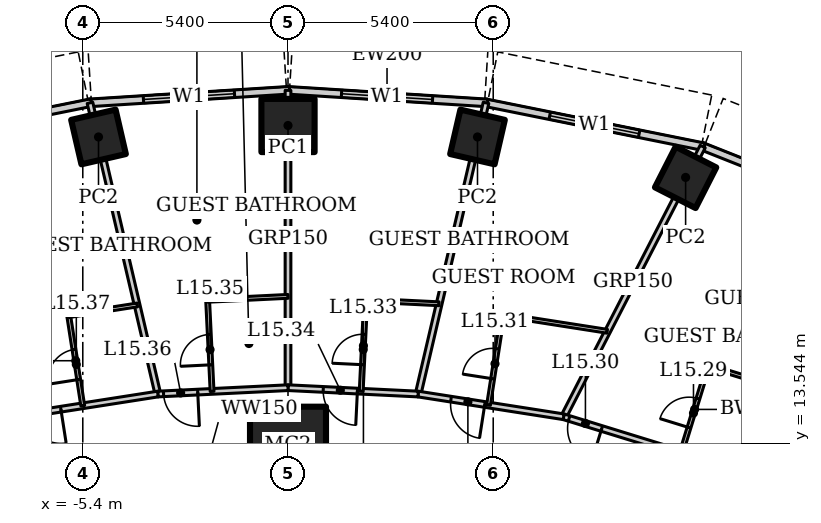
"""IFC4 building model, lengths in metres.
Left out: names, types, materials, properties, quantities, classifications, styles, units other than length and angle.
Written with IfcOpenShell. Run it as: python <this file> out.ifc"""

import sys

from ifc_helpers import new_model, si_unit, direction, frame, frame_2d, origin, origin_2d, place, context, subcontext, project, spatial, rectangle, hollow_rectangle, extrude, element, fill, save


model = new_model("IFC4")
c1 = context("Model", 3, precision=1e-05, world=origin(), true_north=direction((0.0, 1.0)))
c2 = subcontext(c1, "Body", "Model", "MODEL_VIEW")
j1 = project(units=[si_unit("LENGTHUNIT", "METRE"), si_unit("PLANEANGLEUNIT", "RADIAN")], contexts=[c1])
p1 = place(None, origin())
s1 = spatial("IfcSite", under=j1, at=p1, CompositionType="ELEMENT")
p2 = place(p1, origin())
s2 = spatial("IfcBuilding", under=s1, at=p2, CompositionType="ELEMENT")
p3 = place(p2, frame((0.0, 0.0, 69.4)))
s3 = spatial("IfcBuildingStorey", under=s2, at=p3, CompositionType="ELEMENT", Elevation=69.4)
p4 = place(p3, frame((0.0, 13.5, 0.0), z_axis=(0.0, 0.0, 1.0), x_axis=(1.0, 0.0, 0.0)))
e1 = element("IfcColumn", 1, at=p4, inside=s3, PredefinedType="COLUMN", context=c2, shape_type="SweptSolid", body=[
    extrude(hollow_rectangle(XDim=2.0, YDim=2.0, WallThickness=0.17, at=origin_2d()), origin(), (0.0, 0.0, 1.0), 3.6),
])
for number, where, z_axis, x_axis in (
    (2, (10.463, 20.534, 0.0), (0.0, 0.0, 1.0), (0.454, 0.891, 0.0)),
    (3, (4.986, 21.598, 0.0), (0.0, 0.0, 1.0), (0.225, 0.974, 0.0)),
):
    element("IfcColumn", number, at=place(p3, frame(where, z_axis=z_axis, x_axis=x_axis)), inside=s3, PredefinedType="COLUMN", context=c2, shape_type="SweptSolid", body=[
        extrude(hollow_rectangle(XDim=1.2, YDim=1.2, WallThickness=0.1, at=origin_2d()), origin(), (0.0, 0.0, 1.0), 3.6),
    ])
p5 = place(p3, frame((0.0, 21.9, 0.0), z_axis=(0.0, 0.0, 1.0), x_axis=(1.0, 0.0, 0.0)))
e4 = element("IfcColumn", 4, at=p5, inside=s3, PredefinedType="COLUMN", context=c2, shape_type="SweptSolid", body=[
    extrude(hollow_rectangle(XDim=1.4, YDim=1.4, WallThickness=0.1, at=origin_2d()), origin(), (0.0, 0.0, 1.0), 3.6),
])
p6 = place(p3, frame((-4.986, 21.598, 0.0), z_axis=(0.0, 0.0, 1.0), x_axis=(0.974370064785, 0.224951054344, 0.0)))
e5 = element("IfcColumn", 5, at=p6, inside=s3, PredefinedType="COLUMN", context=c2, shape_type="SweptSolid", body=[
    extrude(hollow_rectangle(XDim=1.2, YDim=1.2, WallThickness=0.1, at=origin_2d()), origin(), (0.0, 0.0, 1.0), 3.6),
])
p7 = place(p3, frame((18.018, 18.523, 0.0), z_axis=(0.0, 0.0, 1.0), x_axis=(-0.929358351251, 0.369178892895, 0.0)))
e6 = element("IfcWall", 6, at=p7, inside=s3, PredefinedType="SOLIDWALL", context=c2, shape_type="SweptSolid", body=[
    extrude(rectangle(XDim=7.692, YDim=0.2, at=frame_2d((3.846, 0.0))), origin(), (0.0, 0.0, 1.0), 3.45),
])
p8 = place(p7, frame((2.646, 0.0, 0.5)))
e7 = element("IfcOpeningElement", 7, at=p8, cuts=e6, PredefinedType="OPENING", context=c2, shape_type="SweptSolid", body=[
    extrude(rectangle(XDim=2.4, YDim=2.2, at=frame_2d((1.2, 1.1))), frame((0.0, 0.11, 0.0), z_axis=(0.0, -1.0, 0.0), x_axis=(1.0, 0.0, 0.0)), (0.0, 0.0, 1.0), 0.22),
])
p9 = place(p3, frame((10.957, 21.337, 0.0), z_axis=(0.0, 0.0, 1.0), x_axis=(-0.980251657452, 0.197754110105, 0.0)))
e8 = element("IfcWall", 8, at=p9, inside=s3, PredefinedType="SOLIDWALL", context=c2, shape_type="SweptSolid", body=[
    extrude(rectangle(XDim=5.904, YDim=0.2, at=frame_2d((2.952, 0.0))), origin(), (0.0, 0.0, 1.0), 3.45),
])
p10 = place(p9, frame((1.752, 0.0, 0.5)))
e9 = element("IfcOpeningElement", 9, at=p10, cuts=e8, PredefinedType="OPENING", context=c2, shape_type="SweptSolid", body=[
    extrude(rectangle(XDim=2.4, YDim=2.2, at=frame_2d((1.2, 1.1))), frame((0.0, 0.11, 0.0), z_axis=(0.0, -1.0, 0.0), x_axis=(1.0, 0.0, 0.0)), (0.0, 0.0, 1.0), 0.22),
])
p11 = place(p3, frame((5.253, 22.493, 0.0), z_axis=(0.0, 0.0, 1.0), x_axis=(-0.998018582375, 0.062919863585, 0.0)))
e10 = element("IfcWall", 10, at=p11, inside=s3, PredefinedType="SOLIDWALL", context=c2, shape_type="SweptSolid", body=[
    extrude(rectangle(XDim=5.304, YDim=0.2, at=frame_2d((2.652, 0.0))), origin(), (0.0, 0.0, 1.0), 3.45),
])
p12 = place(p11, frame((1.452, 0.0, 0.5)))
e11 = element("IfcOpeningElement", 11, at=p12, cuts=e10, PredefinedType="OPENING", context=c2, shape_type="SweptSolid", body=[
    extrude(rectangle(XDim=2.4, YDim=2.2, at=frame_2d((1.2, 1.1))), frame((0.0, 0.11, 0.0), z_axis=(0.0, -1.0, 0.0), x_axis=(1.0, 0.0, 0.0)), (0.0, 0.0, 1.0), 0.22),
])
p13 = place(p3, frame((0.041, 22.827, 0.0), z_axis=(0.0, 0.0, 1.0), x_axis=(-0.998018582375, -0.062919863585, 0.0)))
e12 = element("IfcWall", 12, at=p13, inside=s3, PredefinedType="SOLIDWALL", context=c2, shape_type="SweptSolid", body=[
    extrude(rectangle(XDim=5.304, YDim=0.2, at=frame_2d((2.652, 0.0))), origin(), (0.0, 0.0, 1.0), 3.45),
])
p14 = place(p13, frame((1.452, 0.0, 0.5)))
e13 = element("IfcOpeningElement", 13, at=p14, cuts=e12, PredefinedType="OPENING", context=c2, shape_type="SweptSolid", body=[
    extrude(rectangle(XDim=2.4, YDim=2.2, at=frame_2d((1.2, 1.1))), frame((0.0, 0.11, 0.0), z_axis=(0.0, -1.0, 0.0), x_axis=(1.0, 0.0, 0.0)), (0.0, 0.0, 1.0), 0.22),
])
p15 = place(p3, frame((-5.17, 22.504, 0.0), z_axis=(0.0, 0.0, 1.0), x_axis=(-0.980251657452, -0.197754110105, 0.0)))
e14 = element("IfcWall", 14, at=p15, inside=s3, PredefinedType="SOLIDWALL", context=c2, shape_type="SweptSolid", body=[
    extrude(rectangle(XDim=5.904, YDim=0.2, at=frame_2d((2.952, 0.0))), origin(), (0.0, 0.0, 1.0), 3.45),
])
p16 = place(p15, frame((1.752, 0.0, 0.5)))
e15 = element("IfcOpeningElement", 15, at=p16, cuts=e14, PredefinedType="OPENING", context=c2, shape_type="SweptSolid", body=[
    extrude(rectangle(XDim=2.4, YDim=2.2, at=frame_2d((1.2, 1.1))), frame((0.0, 0.11, 0.0), z_axis=(0.0, -1.0, 0.0), x_axis=(1.0, 0.0, 0.0)), (0.0, 0.0, 1.0), 0.22),
])
p17 = place(p3, frame((10.912, 21.346, 0.0), z_axis=(0.0, 0.0, 1.0), x_axis=(-0.45752665959, -0.889195904042, 0.0)))
e16 = element("IfcWall", 16, at=p17, inside=s3, PredefinedType="PARTITIONING", context=c2, shape_type="SweptSolid", body=[
    extrude(rectangle(XDim=7.997, YDim=0.15, at=frame_2d((3.999, 0.0))), origin(), (0.0, 0.0, 1.0), 2.528),
])
p18 = place(p3, frame((5.211, 22.496, 0.0), z_axis=(0.0, 0.0, 1.0), x_axis=(-0.227056984461, -0.973881474209, 0.0)))
e17 = element("IfcWall", 17, at=p18, inside=s3, PredefinedType="PARTITIONING", context=c2, shape_type="SweptSolid", body=[
    extrude(rectangle(XDim=7.869, YDim=0.15, at=frame_2d((3.934, 0.0))), origin(), (0.0, 0.0, 1.0), 2.767),
])
p19 = place(p3, frame((0.0, 22.825, 0.0), z_axis=(0.0, 0.0, 1.0), x_axis=(0.0, -1.0, 0.0)))
e18 = element("IfcWall", 18, at=p19, inside=s3, PredefinedType="PARTITIONING", context=c2, shape_type="SweptSolid", body=[
    extrude(rectangle(XDim=7.825, YDim=0.15, at=frame_2d((3.912, 0.0))), origin(), (0.0, 0.0, 1.0), 2.924),
])
p20 = place(p3, frame((-5.211, 22.496, 0.0), z_axis=(0.0, 0.0, 1.0), x_axis=(0.227056984461, -0.973881474209, 0.0)))
e19 = element("IfcWall", 19, at=p20, inside=s3, PredefinedType="PARTITIONING", context=c2, shape_type="SweptSolid", body=[
    extrude(rectangle(XDim=7.869, YDim=0.15, at=frame_2d((3.934, 0.0))), origin(), (0.0, 0.0, 1.0), 2.767),
])
p21 = place(p3, frame((12.257, 12.693, 0.0), z_axis=(0.0, 0.0, 1.0), x_axis=(-0.955657956744, 0.294478980085, 0.0)))
e20 = element("IfcWall", 20, at=p21, inside=s3, PredefinedType="PARTITIONING", context=c2, shape_type="SweptSolid", body=[
    extrude(rectangle(XDim=5.236, YDim=0.15, at=frame_2d((2.618, 0.0))), origin(), (0.0, 0.0, 1.0), 3.45),
])
p22 = place(p21, frame((4.186, 0.0, 0.0)))
e21 = element("IfcOpeningElement", 21, at=p22, cuts=e20, PredefinedType="OPENING", context=c2, shape_type="SweptSolid", body=[
    extrude(rectangle(XDim=0.9, YDim=2.1, at=frame_2d((0.45, 1.05))), frame((0.0, 0.085, 0.0), z_axis=(0.0, -1.0, 0.0), x_axis=(1.0, 0.0, 0.0)), (0.0, 0.0, 1.0), 0.17),
])
p23 = place(p3, frame((7.253, 14.235, 0.0), z_axis=(0.0, 0.0, 1.0), x_axis=(-0.988015036573, 0.154357660987, 0.0)))
e22 = element("IfcWall", 22, at=p23, inside=s3, PredefinedType="PARTITIONING", context=c2, shape_type="SweptSolid", body=[
    extrude(rectangle(XDim=3.875, YDim=0.15, at=frame_2d((1.938, 0.0))), origin(), (0.0, 0.0, 1.0), 3.45),
])
p24 = place(p23, frame((2.1, 0.0, 0.0)))
e23 = element("IfcOpeningElement", 23, at=p24, cuts=e22, PredefinedType="OPENING", context=c2, shape_type="SweptSolid", body=[
    extrude(rectangle(XDim=0.9, YDim=2.1, at=frame_2d((0.45, 1.05))), frame((0.0, 0.085, 0.0), z_axis=(0.0, -1.0, 0.0), x_axis=(1.0, 0.0, 0.0)), (0.0, 0.0, 1.0), 0.17),
])
p25 = place(p3, frame((3.424, 14.833, 0.0), z_axis=(0.0, 0.0, 1.0), x_axis=(-0.998809560203, 0.048779733975, 0.0)))
e24 = element("IfcWall", 24, at=p25, inside=s3, PredefinedType="PARTITIONING", context=c2, shape_type="SweptSolid", body=[
    extrude(rectangle(XDim=3.428, YDim=0.15, at=frame_2d((1.714, 0.0))), origin(), (0.0, 0.0, 1.0), 3.45),
])
p26 = place(p25, frame((1.6, 0.0, 0.0)))
e25 = element("IfcOpeningElement", 25, at=p26, cuts=e24, PredefinedType="OPENING", context=c2, shape_type="SweptSolid", body=[
    extrude(rectangle(XDim=0.9, YDim=2.1, at=frame_2d((0.45, 1.05))), frame((0.0, 0.085, 0.0), z_axis=(0.0, -1.0, 0.0), x_axis=(1.0, 0.0, 0.0)), (0.0, 0.0, 1.0), 0.17),
])
p27 = place(p3, frame((0.0, 15.0, 0.0), z_axis=(0.0, 0.0, 1.0), x_axis=(-0.998809560203, -0.048779733975, 0.0)))
e26 = element("IfcWall", 26, at=p27, inside=s3, PredefinedType="PARTITIONING", context=c2, shape_type="SweptSolid", body=[
    extrude(rectangle(XDim=3.428, YDim=0.15, at=frame_2d((1.714, 0.0))), origin(), (0.0, 0.0, 1.0), 3.45),
])
p28 = place(p27, frame((2.378, 0.0, 0.0)))
e27 = element("IfcOpeningElement", 27, at=p28, cuts=e26, PredefinedType="OPENING", context=c2, shape_type="SweptSolid", body=[
    extrude(rectangle(XDim=0.9, YDim=2.1, at=frame_2d((0.45, 1.05))), frame((0.0, 0.085, 0.0), z_axis=(0.0, -1.0, 0.0), x_axis=(1.0, 0.0, 0.0)), (0.0, 0.0, 1.0), 0.17),
])
p29 = place(p3, frame((-3.424, 14.833, 0.0), z_axis=(0.0, 0.0, 1.0), x_axis=(-0.988015036573, -0.154357660987, 0.0)))
e28 = element("IfcWall", 28, at=p29, inside=s3, PredefinedType="PARTITIONING", context=c2, shape_type="SweptSolid", body=[
    extrude(rectangle(XDim=3.875, YDim=0.15, at=frame_2d((1.938, 0.0))), origin(), (0.0, 0.0, 1.0), 3.45),
])
p30 = place(p29, frame((2.583, 0.0, 0.0)))
e29 = element("IfcOpeningElement", 29, at=p30, cuts=e28, PredefinedType="OPENING", context=c2, shape_type="SweptSolid", body=[
    extrude(rectangle(XDim=0.9, YDim=2.1, at=frame_2d((0.45, 1.05))), frame((0.0, 0.085, 0.0), z_axis=(0.0, -1.0, 0.0), x_axis=(1.0, 0.0, 0.0)), (0.0, 0.0, 1.0), 0.17),
])
p31 = place(p3, frame((10.346, 13.281, 0.0), z_axis=(0.0, 0.0, 1.0), x_axis=(0.294478957423, 0.955657963727, 0.0)))
e30 = element("IfcWall", 30, at=p31, inside=s3, PredefinedType="PARTITIONING", context=c2, shape_type="SweptSolid", body=[
    extrude(rectangle(XDim=2.4, YDim=0.1, at=frame_2d((1.2, 0.0))), origin(), (0.0, 0.0, 1.0), 3.45),
])
p32 = place(p31, frame((0.7, 0.0, 0.0)))
e31 = element("IfcOpeningElement", 31, at=p32, cuts=e30, PredefinedType="OPENING", context=c2, shape_type="SweptSolid", body=[
    extrude(rectangle(XDim=0.8, YDim=2.1, at=frame_2d((0.4, 1.05))), frame((0.0, 0.06, 0.0), z_axis=(0.0, -1.0, 0.0), x_axis=(1.0, 0.0, 0.0)), (0.0, 0.0, 1.0), 0.12),
])
p33 = place(p3, frame((11.052, 15.575, 0.0), z_axis=(0.0, 0.0, 1.0), x_axis=(0.955641033268, -0.294533895391, 0.0)))
e32 = element("IfcWall", 32, at=p33, inside=s3, PredefinedType="PARTITIONING", context=c2, shape_type="SweptSolid", body=[
    extrude(rectangle(XDim=3.216, YDim=0.1, at=frame_2d((1.608, 0.0))), origin(), (0.0, 0.0, 1.0), 3.45),
])
p34 = place(p3, frame((5.277, 14.543, 0.0), z_axis=(0.0, 0.0, 1.0), x_axis=(0.154426532979, 0.988004274238, 0.0)))
e33 = element("IfcWall", 33, at=p34, inside=s3, PredefinedType="PARTITIONING", context=c2, shape_type="SweptSolid", body=[
    extrude(rectangle(XDim=2.4, YDim=0.1, at=frame_2d((1.2, 0.0))), origin(), (0.0, 0.0, 1.0), 3.45),
])
p35 = place(p34, frame((0.7, 0.0, 0.0)))
e34 = element("IfcOpeningElement", 34, at=p35, cuts=e33, PredefinedType="OPENING", context=c2, shape_type="SweptSolid", body=[
    extrude(rectangle(XDim=0.8, YDim=2.1, at=frame_2d((0.4, 1.05))), frame((0.0, 0.06, 0.0), z_axis=(0.0, -1.0, 0.0), x_axis=(1.0, 0.0, 0.0)), (0.0, 0.0, 1.0), 0.12),
])
p36 = place(p3, frame((5.647, 16.915, 0.0), z_axis=(0.0, 0.0, 1.0), x_axis=(0.988015375833, -0.154355489429, 0.0)))
e35 = element("IfcWall", 35, at=p36, inside=s3, PredefinedType="PARTITIONING", context=c2, shape_type="SweptSolid", body=[
    extrude(rectangle(XDim=2.785, YDim=0.1, at=frame_2d((1.393, 0.0))), origin(), (0.0, 0.0, 1.0), 3.45),
])
p37 = place(p3, frame((1.926, 14.906, 0.0), z_axis=(0.0, 0.0, 1.0), x_axis=(0.048725028858, 0.998812230383, 0.0)))
e36 = element("IfcWall", 36, at=p37, inside=s3, PredefinedType="PARTITIONING", context=c2, shape_type="SweptSolid", body=[
    extrude(rectangle(XDim=2.4, YDim=0.1, at=frame_2d((1.2, 0.0))), origin(), (0.0, 0.0, 1.0), 2.749),
])
p38 = place(p37, frame((0.7, 0.0, 0.0)))
e37 = element("IfcOpeningElement", 37, at=p38, cuts=e36, PredefinedType="OPENING", context=c2, shape_type="SweptSolid", body=[
    extrude(rectangle(XDim=0.8, YDim=2.1, at=frame_2d((0.4, 1.05))), frame((0.0, 0.06, 0.0), z_axis=(0.0, -1.0, 0.0), x_axis=(1.0, 0.0, 0.0)), (0.0, 0.0, 1.0), 0.12),
])
p39 = place(p3, frame((2.043, 17.303, 0.0), z_axis=(0.0, 0.0, 1.0), x_axis=(0.998809649749, -0.048777900405, 0.0)))
e38 = element("IfcWall", 38, at=p39, inside=s3, PredefinedType="PARTITIONING", context=c2, shape_type="SweptSolid", body=[
    extrude(rectangle(XDim=1.932, YDim=0.1, at=frame_2d((0.966, 0.0))), origin(), (0.0, 0.0, 1.0), 3.45),
])
p40 = place(p3, frame((-1.998, 14.903, 0.0), z_axis=(0.0, 0.0, 1.0), x_axis=(-0.048831470304, 0.998807032168, 0.0)))
e39 = element("IfcWall", 39, at=p40, inside=s3, PredefinedType="PARTITIONING", context=c2, shape_type="SweptSolid", body=[
    extrude(rectangle(XDim=2.4, YDim=0.1, at=frame_2d((1.2, 0.0))), origin(), (0.0, 0.0, 1.0), 2.749),
])
p41 = place(p40, frame((0.7, 0.0, 0.0)))
e40 = element("IfcOpeningElement", 40, at=p41, cuts=e39, PredefinedType="OPENING", context=c2, shape_type="SweptSolid", body=[
    extrude(rectangle(XDim=0.8, YDim=2.1, at=frame_2d((0.4, 1.05))), frame((0.0, 0.06, 0.0), z_axis=(0.0, -1.0, 0.0), x_axis=(1.0, 0.0, 0.0)), (0.0, 0.0, 1.0), 0.12),
])
p42 = place(p3, frame((-2.115, 17.3, 0.0), z_axis=(0.0, 0.0, 1.0), x_axis=(0.998809749254, 0.048775862842, 0.0)))
e41 = element("IfcWall", 41, at=p42, inside=s3, PredefinedType="PARTITIONING", context=c2, shape_type="SweptSolid", body=[
    extrude(rectangle(XDim=2.117, YDim=0.1, at=frame_2d((1.059, 0.0))), origin(), (0.0, 0.0, 1.0), 3.45),
])
p43 = place(p3, frame((-5.4, 14.524, 0.0), z_axis=(0.0, 0.0, 1.0), x_axis=(-0.154426532979, 0.988004274238, 0.0)))
e42 = element("IfcWall", 42, at=p43, inside=s3, PredefinedType="PARTITIONING", context=c2, shape_type="SweptSolid", body=[
    extrude(rectangle(XDim=2.4, YDim=0.1, at=frame_2d((1.2, 0.0))), origin(), (0.0, 0.0, 1.0), 3.45),
])
p44 = place(p43, frame((0.7, 0.0, 0.0)))
e43 = element("IfcOpeningElement", 43, at=p44, cuts=e42, PredefinedType="OPENING", context=c2, shape_type="SweptSolid", body=[
    extrude(rectangle(XDim=0.8, YDim=2.1, at=frame_2d((0.4, 1.05))), frame((0.0, 0.06, 0.0), z_axis=(0.0, -1.0, 0.0), x_axis=(1.0, 0.0, 0.0)), (0.0, 0.0, 1.0), 0.12),
])
p45 = place(p3, frame((-5.771, 16.895, 0.0), z_axis=(0.0, 0.0, 1.0), x_axis=(0.98801840204, 0.154336117711, 0.0)))
e44 = element("IfcWall", 44, at=p45, inside=s3, PredefinedType="PARTITIONING", context=c2, shape_type="SweptSolid", body=[
    extrude(rectangle(XDim=1.827, YDim=0.1, at=frame_2d((0.914, 0.0))), origin(), (0.0, 0.0, 1.0), 3.45),
])
p46 = place(p10, origin())
e45 = element("IfcWindow", 45, at=p46, inside=s3, PartitioningType="SINGLE_PANEL", PredefinedType="WINDOW", context=c2, shape_type="SweptSolid", body=[
    extrude(rectangle(XDim=2.4, YDim=2.2, at=frame_2d((1.2, 1.1))), frame((0.0, 0.03, 0.0), z_axis=(0.0, -1.0, 0.0), x_axis=(1.0, 0.0, 0.0)), (0.0, 0.0, 1.0), 0.06),
])
fill(e9, e45)
p47 = place(p12, origin())
e46 = element("IfcWindow", 46, at=p47, inside=s3, PartitioningType="SINGLE_PANEL", PredefinedType="WINDOW", context=c2, shape_type="SweptSolid", body=[
    extrude(rectangle(XDim=2.4, YDim=2.2, at=frame_2d((1.2, 1.1))), frame((0.0, 0.03, 0.0), z_axis=(0.0, -1.0, 0.0), x_axis=(1.0, 0.0, 0.0)), (0.0, 0.0, 1.0), 0.06),
])
fill(e11, e46)
p48 = place(p14, origin())
e47 = element("IfcWindow", 47, at=p48, inside=s3, PartitioningType="SINGLE_PANEL", PredefinedType="WINDOW", context=c2, shape_type="SweptSolid", body=[
    extrude(rectangle(XDim=2.4, YDim=2.2, at=frame_2d((1.2, 1.1))), frame((0.0, 0.03, 0.0), z_axis=(0.0, -1.0, 0.0), x_axis=(1.0, 0.0, 0.0)), (0.0, 0.0, 1.0), 0.06),
])
fill(e13, e47)
p49 = place(p32, origin())
e48 = element("IfcDoor", 48, at=p49, inside=s3, OperationType="SINGLE_SWING_LEFT", PredefinedType="DOOR", context=c2, shape_type="SweptSolid", body=[
    extrude(rectangle(XDim=0.8, YDim=2.1, at=frame_2d((0.4, 1.05))), frame((0.0, 0.025, 0.0), z_axis=(0.0, -1.0, 0.0), x_axis=(1.0, 0.0, 0.0)), (0.0, 0.0, 1.0), 0.05),
])
fill(e31, e48)
p50 = place(p22, origin())
e49 = element("IfcDoor", 49, at=p50, inside=s3, OperationType="SINGLE_SWING_LEFT", PredefinedType="DOOR", context=c2, shape_type="SweptSolid", body=[
    extrude(rectangle(XDim=0.9, YDim=2.1, at=frame_2d((0.45, 1.05))), frame((0.0, 0.025, 0.0), z_axis=(0.0, -1.0, 0.0), x_axis=(1.0, 0.0, 0.0)), (0.0, 0.0, 1.0), 0.05),
])
fill(e21, e49)
p51 = place(p35, origin())
e50 = element("IfcDoor", 50, at=p51, inside=s3, OperationType="SINGLE_SWING_LEFT", PredefinedType="DOOR", context=c2, shape_type="SweptSolid", body=[
    extrude(rectangle(XDim=0.8, YDim=2.1, at=frame_2d((0.4, 1.05))), frame((0.0, 0.025, 0.0), z_axis=(0.0, -1.0, 0.0), x_axis=(1.0, 0.0, 0.0)), (0.0, 0.0, 1.0), 0.05),
])
fill(e34, e50)
p52 = place(p24, origin())
e51 = element("IfcDoor", 51, at=p52, inside=s3, OperationType="SINGLE_SWING_LEFT", PredefinedType="DOOR", context=c2, shape_type="SweptSolid", body=[
    extrude(rectangle(XDim=0.9, YDim=2.1, at=frame_2d((0.45, 1.05))), frame((0.0, 0.025, 0.0), z_axis=(0.0, -1.0, 0.0), x_axis=(1.0, 0.0, 0.0)), (0.0, 0.0, 1.0), 0.05),
])
fill(e23, e51)
p53 = place(p38, origin())
e52 = element("IfcDoor", 52, at=p53, inside=s3, OperationType="SINGLE_SWING_LEFT", PredefinedType="DOOR", context=c2, shape_type="SweptSolid", body=[
    extrude(rectangle(XDim=0.8, YDim=2.1, at=frame_2d((0.4, 1.05))), frame((0.0, 0.025, 0.0), z_axis=(0.0, -1.0, 0.0), x_axis=(1.0, 0.0, 0.0)), (0.0, 0.0, 1.0), 0.05),
])
fill(e37, e52)
p54 = place(p26, origin())
e53 = element("IfcDoor", 53, at=p54, inside=s3, OperationType="SINGLE_SWING_LEFT", PredefinedType="DOOR", context=c2, shape_type="SweptSolid", body=[
    extrude(rectangle(XDim=0.9, YDim=2.1, at=frame_2d((0.45, 1.05))), frame((0.0, 0.025, 0.0), z_axis=(0.0, -1.0, 0.0), x_axis=(1.0, 0.0, 0.0)), (0.0, 0.0, 1.0), 0.05),
])
fill(e25, e53)
p55 = place(p41, origin())
e54 = element("IfcDoor", 54, at=p55, inside=s3, OperationType="SINGLE_SWING_LEFT", PredefinedType="DOOR", context=c2, shape_type="SweptSolid", body=[
    extrude(rectangle(XDim=0.8, YDim=2.1, at=frame_2d((0.4, 1.05))), frame((0.0, 0.025, 0.0), z_axis=(0.0, -1.0, 0.0), x_axis=(1.0, 0.0, 0.0)), (0.0, 0.0, 1.0), 0.05),
])
fill(e40, e54)
p56 = place(p28, origin())
e55 = element("IfcDoor", 55, at=p56, inside=s3, OperationType="SINGLE_SWING_LEFT", PredefinedType="DOOR", context=c2, shape_type="SweptSolid", body=[
    extrude(rectangle(XDim=0.9, YDim=2.1, at=frame_2d((0.45, 1.05))), frame((0.0, 0.025, 0.0), z_axis=(0.0, -1.0, 0.0), x_axis=(1.0, 0.0, 0.0)), (0.0, 0.0, 1.0), 0.05),
])
fill(e27, e55)
p57 = place(p44, origin())
e56 = element("IfcDoor", 56, at=p57, inside=s3, OperationType="SINGLE_SWING_LEFT", PredefinedType="DOOR", context=c2, shape_type="SweptSolid", body=[
    extrude(rectangle(XDim=0.8, YDim=2.1, at=frame_2d((0.4, 1.05))), frame((0.0, 0.025, 0.0), z_axis=(0.0, -1.0, 0.0), x_axis=(1.0, 0.0, 0.0)), (0.0, 0.0, 1.0), 0.05),
])
fill(e43, e56)
p58 = place(p30, origin())
e57 = element("IfcDoor", 57, at=p58, inside=s3, OperationType="SINGLE_SWING_LEFT", PredefinedType="DOOR", context=c2, shape_type="SweptSolid", body=[
    extrude(rectangle(XDim=0.9, YDim=2.1, at=frame_2d((0.45, 1.05))), frame((0.0, 0.025, 0.0), z_axis=(0.0, -1.0, 0.0), x_axis=(1.0, 0.0, 0.0)), (0.0, 0.0, 1.0), 0.05),
])
fill(e29, e57)
save(model, sys.argv[1])
